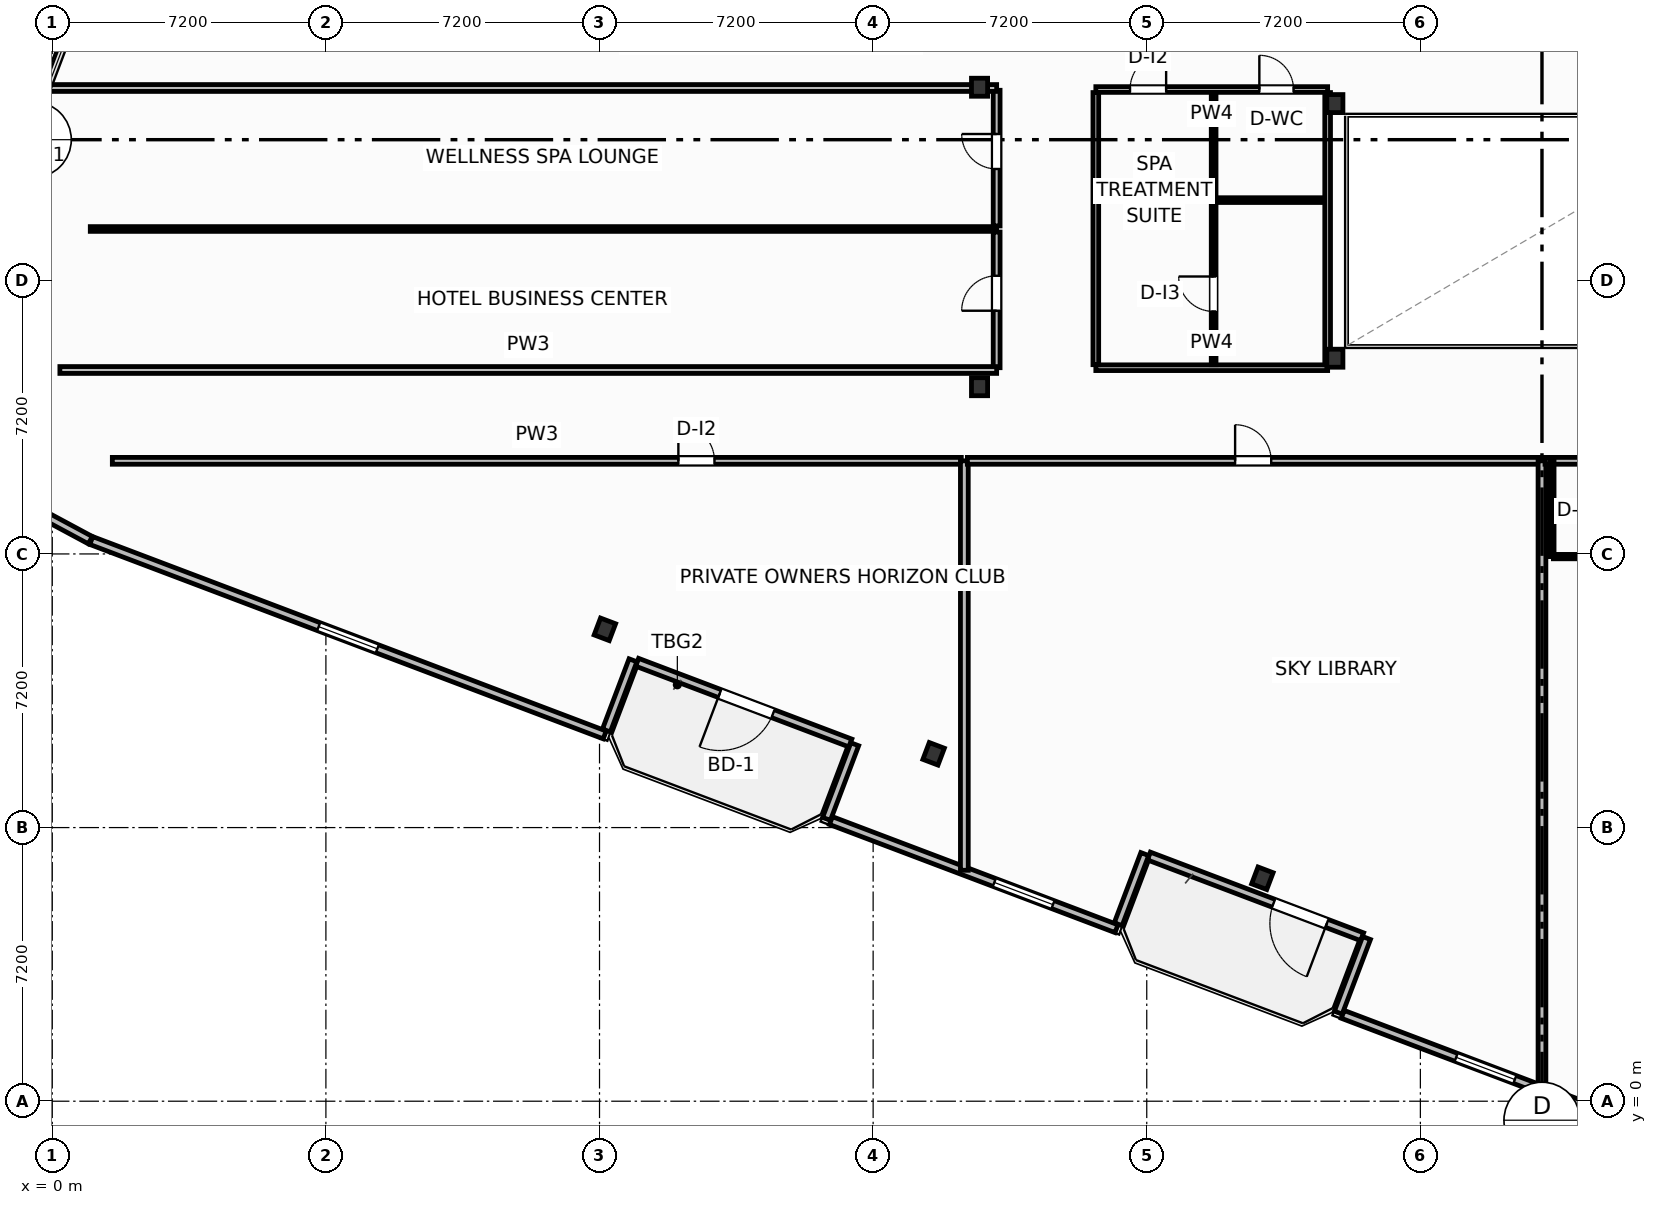
"""IFC4 building model, lengths in metres.
Left out: names, types, materials, properties, quantities, classifications, styles, units other than length and angle.
Written with IfcOpenShell. Run it as: python <this file> out.ifc"""

import sys

from ifc_helpers import new_model, si_unit, direction, frame, frame_2d, origin, origin_2d, place, context, subcontext, project, spatial, rectangle, i_section, extrude, element, fill, save


model = new_model("IFC4")
c1 = context("Model", 3, precision=1e-05, world=origin(), true_north=direction((0.0, 1.0)))
c2 = subcontext(c1, "Body", "Model", "MODEL_VIEW")
j1 = project(units=[si_unit("LENGTHUNIT", "METRE"), si_unit("PLANEANGLEUNIT", "RADIAN")], contexts=[c1])
p1 = place(None, origin())
s1 = spatial("IfcSite", under=j1, at=p1, CompositionType="ELEMENT")
p2 = place(p1, origin())
s2 = spatial("IfcBuilding", under=s1, at=p2, CompositionType="ELEMENT")
p3 = place(p2, frame((0.0, 0.0, 102.1)))
s3 = spatial("IfcBuildingStorey", under=s2, at=p3, CompositionType="ELEMENT", Elevation=102.1)
for number, where, z_axis, x_axis in (
    (1, (33.75, 19.55, 0.0), (0.0, 0.0, 1.0), (1.0, 0.0, 0.0)),
    (2, (33.75, 26.25, 0.0), (0.0, 0.0, 1.0), (1.0, 0.0, 0.0)),
    (3, (24.4, 18.8, 0.0), (0.0, 0.0, 1.0), (1.0, 0.0, 0.0)),
    (4, (24.4, 26.68, 0.0), (0.0, 0.0, 1.0), (1.0, 0.0, 0.0)),
    (5, (14.541, 12.416, 0.0), (0.0, 0.0, 1.0), (0.935, -0.354, 0.0)),
    (6, (23.192, 9.141, 0.0), (0.0, 0.0, 1.0), (0.935, -0.354, 0.0)),
    (7, (31.843, 5.866, 0.0), (0.0, 0.0, 1.0), (0.935, -0.354, 0.0)),
):
    element("IfcColumn", number, at=place(p3, frame(where, z_axis=z_axis, x_axis=x_axis)), inside=s3, PredefinedType="COLUMN", context=c2, shape_type="SweptSolid", body=[
        extrude(i_section(OverallWidth=0.424, OverallDepth=0.474, WebThickness=0.048, FlangeThickness=0.077, FilletRadius=0.025, at=origin_2d()), origin(), (0.0, 0.0, 1.0), 3.7),
    ])
p4 = place(p3, frame((21.0, 9.425, 0.0), z_axis=(0.0, 0.0, 1.0), x_axis=(-0.93521416643, 0.354082565101, 0.0)))
e8 = element("IfcWall", 8, at=p4, inside=s3, PredefinedType="SOLIDWALL", context=c2, shape_type="SweptSolid", body=[
    extrude(rectangle(XDim=6.0, YDim=0.22, at=frame_2d((3.0, 0.0))), origin(), (0.0, 0.0, 1.0), 2.73),
])
p5 = place(p4, frame((2.176, 0.0, 0.0)))
e9 = element("IfcOpeningElement", 9, at=p5, cuts=e8, PredefinedType="OPENING", context=c2, shape_type="SweptSolid", body=[
    extrude(rectangle(XDim=1.5, YDim=2.25, at=frame_2d((0.75, 1.125))), frame((0.0, 0.12, 0.0), z_axis=(0.0, -1.0, 0.0), x_axis=(1.0, 0.0, 0.0)), (0.0, 0.0, 1.0), 0.24),
])
p6 = place(p3, frame((34.468, 4.327, 0.0), z_axis=(0.0, 0.0, 1.0), x_axis=(-0.9352192676, 0.354069091436, 0.0)))
e10 = element("IfcWall", 10, at=p6, inside=s3, PredefinedType="SOLIDWALL", context=c2, shape_type="SweptSolid", body=[
    extrude(rectangle(XDim=6.0, YDim=0.22, at=frame_2d((3.0, 0.0))), origin(), (0.0, 0.0, 1.0), 2.73),
])
p7 = place(p6, frame((0.992, 0.0, 0.0)))
e11 = element("IfcOpeningElement", 11, at=p7, cuts=e10, PredefinedType="OPENING", context=c2, shape_type="SweptSolid", body=[
    extrude(rectangle(XDim=1.5, YDim=2.25, at=frame_2d((0.75, 1.125))), frame((0.0, 0.12, 0.0), z_axis=(0.0, -1.0, 0.0), x_axis=(1.0, 0.0, 0.0)), (0.0, 0.0, 1.0), 0.24),
])
p8 = place(p3, frame((-0.197, 15.406, 0.0), z_axis=(0.0, 0.0, 1.0), x_axis=(0.881023507585, -0.47307248819, 0.0)))
e12 = element("IfcWall", 12, at=p8, inside=s3, PredefinedType="SOLIDWALL", context=c2, shape_type="SweptSolid", body=[
    extrude(rectangle(XDim=1.361, YDim=0.22, at=frame_2d((0.68, 0.0))), origin(), (0.0, 0.0, 1.0), 2.73),
])
p9 = place(p3, frame((1.026, 14.753, 0.0), z_axis=(0.0, 0.0, 1.0), x_axis=(0.935222448475, -0.354060689526, 0.0)))
e13 = element("IfcWall", 13, at=p9, inside=s3, PredefinedType="SOLIDWALL", context=c2, shape_type="SweptSolid", body=[
    extrude(rectangle(XDim=14.447, YDim=0.22, at=frame_2d((7.224, 0.0))), origin(), (0.0, 0.0, 1.0), 2.73),
])
p10 = place(p9, frame((6.399, 0.0, 0.8)))
e14 = element("IfcOpeningElement", 14, at=p10, cuts=e13, PredefinedType="OPENING", context=c2, shape_type="SweptSolid", body=[
    extrude(rectangle(XDim=1.65, YDim=1.65, at=frame_2d((0.825, 0.825))), frame((0.0, 0.12, 0.0), z_axis=(0.0, -1.0, 0.0), x_axis=(1.0, 0.0, 0.0)), (0.0, 0.0, 1.0), 0.24),
])
p11 = place(p3, frame((14.581, 9.755, 0.0), z_axis=(0.0, 0.0, 1.0), x_axis=(0.354061611705, 0.935222099352, 0.0)))
e15 = element("IfcWall", 15, at=p11, inside=s3, PredefinedType="SOLIDWALL", context=c2, shape_type="SweptSolid", body=[
    extrude(rectangle(XDim=1.975, YDim=0.22, at=frame_2d((0.987, 0.0))), origin(), (0.0, 0.0, 1.0), 2.73),
])
p12 = place(p3, frame((21.116, 9.392, 0.0), z_axis=(0.0, 0.0, 1.0), x_axis=(-0.353988291547, -0.935249854022, 0.0)))
e16 = element("IfcWall", 16, at=p12, inside=s3, PredefinedType="SOLIDWALL", context=c2, shape_type="SweptSolid", body=[
    extrude(rectangle(XDim=2.1, YDim=0.22, at=frame_2d((1.05, 0.0))), origin(), (0.0, 0.0, 1.0), 2.73),
])
p13 = place(p3, frame((20.49, 7.384, 0.0), z_axis=(0.0, 0.0, 1.0), x_axis=(0.935230796934, -0.354038636968, 0.0)))
e17 = element("IfcWall", 17, at=p13, inside=s3, PredefinedType="SOLIDWALL", context=c2, shape_type="SweptSolid", body=[
    extrude(rectangle(XDim=8.035, YDim=0.22, at=frame_2d((4.018, 0.0))), origin(), (0.0, 0.0, 1.0), 2.73),
])
p14 = place(p13, frame((4.597, 0.0, 0.8)))
e18 = element("IfcOpeningElement", 18, at=p14, cuts=e17, PredefinedType="OPENING", context=c2, shape_type="SweptSolid", body=[
    extrude(rectangle(XDim=1.65, YDim=1.65, at=frame_2d((0.825, 0.825))), frame((0.0, 0.12, 0.0), z_axis=(0.0, -1.0, 0.0), x_axis=(1.0, 0.0, 0.0)), (0.0, 0.0, 1.0), 0.24),
])
p15 = place(p3, frame((28.048, 4.656, 0.0), z_axis=(0.0, 0.0, 1.0), x_axis=(0.354128791944, 0.935196663123, 0.0)))
e19 = element("IfcWall", 19, at=p15, inside=s3, PredefinedType="SOLIDWALL", context=c2, shape_type="SweptSolid", body=[
    extrude(rectangle(XDim=1.975, YDim=0.22, at=frame_2d((0.988, 0.0))), origin(), (0.0, 0.0, 1.0), 2.73),
])
p16 = place(p3, frame((34.583, 4.294, 0.0), z_axis=(0.0, 0.0, 1.0), x_axis=(-0.354128469405, -0.935196785258, 0.0)))
e20 = element("IfcWall", 20, at=p16, inside=s3, PredefinedType="SOLIDWALL", context=c2, shape_type="SweptSolid", body=[
    extrude(rectangle(XDim=2.1, YDim=0.22, at=frame_2d((1.05, 0.0))), origin(), (0.0, 0.0, 1.0), 2.73),
])
p17 = place(p3, frame((33.957, 2.286, 0.0), z_axis=(0.0, 0.0, 1.0), x_axis=(0.935220736163, -0.354065212427, 0.0)))
e21 = element("IfcWall", 21, at=p17, inside=s3, PredefinedType="SOLIDWALL", context=c2, shape_type="SweptSolid", body=[
    extrude(rectangle(XDim=8.035, YDim=0.22, at=frame_2d((4.018, 0.0))), origin(), (0.0, 0.0, 1.0), 2.73),
])
p18 = place(p17, frame((3.192, 0.0, 0.8)))
e22 = element("IfcOpeningElement", 22, at=p18, cuts=e21, PredefinedType="OPENING", context=c2, shape_type="SweptSolid", body=[
    extrude(rectangle(XDim=1.65, YDim=1.65, at=frame_2d((0.825, 0.825))), frame((0.0, 0.12, 0.0), z_axis=(0.0, -1.0, 0.0), x_axis=(1.0, 0.0, 0.0)), (0.0, 0.0, 1.0), 0.24),
])
p19 = place(p3, frame((1.58, 16.85, 0.0), z_axis=(0.0, 0.0, 1.0), x_axis=(1.0, 0.0, 0.0)))
e23 = element("IfcWall", 23, at=p19, inside=s3, PredefinedType="PARTITIONING", context=c2, shape_type="SweptSolid", body=[
    extrude(rectangle(XDim=22.34, YDim=0.18, at=frame_2d((11.17, 0.0))), origin(), (0.0, 0.0, 1.0), 3.45),
])
p20 = place(p19, frame((14.895, 0.0, 0.0)))
e24 = element("IfcOpeningElement", 24, at=p20, cuts=e23, PredefinedType="OPENING", context=c2, shape_type="SweptSolid", body=[
    extrude(rectangle(XDim=0.95, YDim=2.05, at=frame_2d((0.475, 1.025))), frame((0.0, 0.1, 0.0), z_axis=(0.0, -1.0, 0.0), x_axis=(1.0, 0.0, 0.0)), (0.0, 0.0, 1.0), 0.2),
])
p21 = place(p3, frame((24.0, 6.076, 0.0), z_axis=(0.0, 0.0, 1.0), x_axis=(0.0, 1.0, 0.0)))
e25 = element("IfcWall", 25, at=p21, inside=s3, PredefinedType="PARTITIONING", context=c2, shape_type="SweptSolid", body=[
    extrude(rectangle(XDim=10.774, YDim=0.205, at=frame_2d((5.387, 0.0))), origin(), (0.0, 0.0, 1.0), 2.58),
])
p22 = place(p3, frame((24.08, 16.85, 0.0), z_axis=(0.0, 0.0, 1.0), x_axis=(1.0, 0.0, 0.0)))
e26 = element("IfcWall", 26, at=p22, inside=s3, PredefinedType="PARTITIONING", context=c2, shape_type="SweptSolid", body=[
    extrude(rectangle(XDim=15.04, YDim=0.18, at=frame_2d((7.52, 0.0))), origin(), (0.0, 0.0, 1.0), 3.45),
])
p23 = place(p22, frame((7.045, 0.0, 0.0)))
e27 = element("IfcOpeningElement", 27, at=p23, cuts=e26, PredefinedType="OPENING", context=c2, shape_type="SweptSolid", body=[
    extrude(rectangle(XDim=0.95, YDim=2.05, at=frame_2d((0.475, 1.025))), frame((0.0, 0.1, 0.0), z_axis=(0.0, -1.0, 0.0), x_axis=(1.0, 0.0, 0.0)), (0.0, 0.0, 1.0), 0.2),
])
p24 = place(p3, frame((39.2, 0.322, 0.0), z_axis=(0.0, 0.0, 1.0), x_axis=(0.0, 1.0, 0.0)))
e28 = element("IfcWall", 28, at=p24, inside=s3, PredefinedType="PARTITIONING", context=c2, shape_type="SweptSolid", body=[
    extrude(rectangle(XDim=16.528, YDim=0.205, at=frame_2d((8.264, 0.0))), origin(), (0.0, 0.0, 1.0), 3.45),
])
p25 = place(p3, frame((39.28, 16.85, 0.0), z_axis=(0.0, 0.0, 1.0), x_axis=(1.0, 0.0, 0.0)))
e29 = element("IfcWall", 29, at=p25, inside=s3, PredefinedType="PARTITIONING", context=c2, shape_type="SweptSolid", body=[
    extrude(rectangle(XDim=14.64, YDim=0.18, at=frame_2d((7.32, 0.0))), origin(), (0.0, 0.0, 1.0), 3.45),
])
p26 = place(p25, frame((3.322, 0.0, 0.0)))
e30 = element("IfcOpeningElement", 30, at=p26, cuts=e29, PredefinedType="OPENING", context=c2, shape_type="SweptSolid", body=[
    extrude(rectangle(XDim=0.95, YDim=2.15, at=frame_2d((0.475, 1.075))), frame((0.0, 0.1, 0.0), z_axis=(0.0, -1.0, 0.0), x_axis=(1.0, 0.0, 0.0)), (0.0, 0.0, 1.0), 0.2),
])
p27 = place(p3, frame((39.5, 14.33, 0.0), z_axis=(0.0, 0.0, 1.0), x_axis=(1.0, 0.0, 0.0)))
e31 = element("IfcWall", 31, at=p27, inside=s3, PredefinedType="PARTITIONING", context=c2, shape_type="SweptSolid", body=[
    extrude(rectangle(XDim=2.15, YDim=0.115, at=frame_2d((1.075, 0.0))), origin(), (0.0, 0.0, 1.0), 3.45),
])
p28 = place(p3, frame((39.46, 14.33, 0.0), z_axis=(0.0, 0.0, 1.0), x_axis=(0.0, 1.0, 0.0)))
e32 = element("IfcWall", 32, at=p28, inside=s3, PredefinedType="PARTITIONING", context=c2, shape_type="SweptSolid", body=[
    extrude(rectangle(XDim=2.52, YDim=0.115, at=frame_2d((1.26, 0.0))), origin(), (0.0, 0.0, 1.0), 3.45),
])
p29 = place(p3, frame((24.85, 19.3, 0.0), z_axis=(0.0, 0.0, 1.0), x_axis=(0.0, 1.0, 0.0)))
e33 = element("IfcWall", 33, at=p29, inside=s3, PredefinedType="PARTITIONING", context=c2, shape_type="SweptSolid", body=[
    extrude(rectangle(XDim=3.57, YDim=0.18, at=frame_2d((1.785, 0.0))), origin(), (0.0, 0.0, 1.0), 3.45),
])
p30 = place(p29, frame((1.5, 0.0, 0.0)))
e34 = element("IfcOpeningElement", 34, at=p30, cuts=e33, PredefinedType="OPENING", context=c2, shape_type="SweptSolid", body=[
    extrude(rectangle(XDim=0.92, YDim=2.05, at=frame_2d((0.46, 1.025))), frame((0.0, 0.1, 0.0), z_axis=(0.0, -1.0, 0.0), x_axis=(1.0, 0.0, 0.0)), (0.0, 0.0, 1.0), 0.2),
])
p31 = place(p3, frame((24.85, 23.03, 0.0), z_axis=(0.0, 0.0, 1.0), x_axis=(0.0, 1.0, 0.0)))
e35 = element("IfcWall", 35, at=p31, inside=s3, PredefinedType="PARTITIONING", context=c2, shape_type="SweptSolid", body=[
    extrude(rectangle(XDim=3.57, YDim=0.18, at=frame_2d((1.785, 0.0))), origin(), (0.0, 0.0, 1.0), 3.45),
])
p32 = place(p31, frame((1.5, 0.0, 0.0)))
e36 = element("IfcOpeningElement", 36, at=p32, cuts=e35, PredefinedType="OPENING", context=c2, shape_type="SweptSolid", body=[
    extrude(rectangle(XDim=0.92, YDim=2.05, at=frame_2d((0.46, 1.025))), frame((0.0, 0.1, 0.0), z_axis=(0.0, -1.0, 0.0), x_axis=(1.0, 0.0, 0.0)), (0.0, 0.0, 1.0), 0.2),
])
p33 = place(p3, frame((1.0, 22.95, 0.0), z_axis=(0.0, 0.0, 1.0), x_axis=(1.0, 0.0, 0.0)))
e37 = element("IfcWall", 37, at=p33, inside=s3, PredefinedType="PARTITIONING", context=c2, shape_type="SweptSolid", body=[
    extrude(rectangle(XDim=23.85, YDim=0.125, at=frame_2d((11.925, 0.0))), origin(), (0.0, 0.0, 1.0), 3.45),
])
p34 = place(p3, frame((0.2, 19.24, 0.0), z_axis=(0.0, 0.0, 1.0), x_axis=(1.0, 0.0, 0.0)))
e38 = element("IfcWall", 38, at=p34, inside=s3, PredefinedType="PARTITIONING", context=c2, shape_type="SweptSolid", body=[
    extrude(rectangle(XDim=24.65, YDim=0.18, at=frame_2d((12.325, 0.0))), origin(), (0.0, 0.0, 1.0), 3.45),
])
p35 = place(p3, frame((-0.086, 26.66, 0.0), z_axis=(0.0, 0.0, 1.0), x_axis=(1.0, 0.0, 0.0)))
e39 = element("IfcWall", 39, at=p35, inside=s3, PredefinedType="PARTITIONING", context=c2, shape_type="SweptSolid", body=[
    extrude(rectangle(XDim=24.936, YDim=0.18, at=frame_2d((12.468, 0.0))), origin(), (0.0, 0.0, 1.0), 2.662),
])
p36 = place(p3, frame((27.46, 26.62, 0.0), z_axis=(0.0, 0.0, 1.0), x_axis=(1.0, 0.0, 0.0)))
e40 = element("IfcWall", 40, at=p36, inside=s3, PredefinedType="PARTITIONING", context=c2, shape_type="SweptSolid", body=[
    extrude(rectangle(XDim=6.1, YDim=0.15, at=frame_2d((3.05, 0.0))), origin(), (0.0, 0.0, 1.0), 2.662),
])
p37 = place(p36, frame((0.9, 0.0, 0.0)))
e41 = element("IfcOpeningElement", 41, at=p37, cuts=e40, PredefinedType="OPENING", context=c2, shape_type="SweptSolid", body=[
    extrude(rectangle(XDim=0.95, YDim=2.05, at=frame_2d((0.475, 1.025))), frame((0.0, 0.085, 0.0), z_axis=(0.0, -1.0, 0.0), x_axis=(1.0, 0.0, 0.0)), (0.0, 0.0, 1.0), 0.17),
])
p38 = place(p36, frame((4.303, 0.0, 0.0)))
e42 = element("IfcOpeningElement", 42, at=p38, cuts=e40, PredefinedType="OPENING", context=c2, shape_type="SweptSolid", body=[
    extrude(rectangle(XDim=0.9, YDim=2.05, at=frame_2d((0.45, 1.025))), frame((0.0, 0.085, 0.0), z_axis=(0.0, -1.0, 0.0), x_axis=(1.0, 0.0, 0.0)), (0.0, 0.0, 1.0), 0.17),
])
p39 = place(p3, frame((27.46, 19.3, 0.0), z_axis=(0.0, 0.0, 1.0), x_axis=(1.0, 0.0, 0.0)))
e43 = element("IfcWall", 43, at=p39, inside=s3, PredefinedType="PARTITIONING", context=c2, shape_type="SweptSolid", body=[
    extrude(rectangle(XDim=6.1, YDim=0.15, at=frame_2d((3.05, 0.0))), origin(), (0.0, 0.0, 1.0), 2.662),
])
p40 = place(p3, frame((30.56, 19.38, 0.0), z_axis=(0.0, 0.0, 1.0), x_axis=(0.0, 1.0, 0.0)))
e44 = element("IfcWall", 44, at=p40, inside=s3, PredefinedType="PARTITIONING", context=c2, shape_type="SweptSolid", body=[
    extrude(rectangle(XDim=7.16, YDim=0.125, at=frame_2d((3.58, 0.0))), origin(), (0.0, 0.0, 1.0), 3.45),
])
p41 = place(p40, frame((1.4, 0.0, 0.0)))
e45 = element("IfcOpeningElement", 45, at=p41, cuts=e44, PredefinedType="OPENING", context=c2, shape_type="SweptSolid", body=[
    extrude(rectangle(XDim=0.92, YDim=2.05, at=frame_2d((0.46, 1.025))), frame((0.0, 0.073, 0.0), z_axis=(0.0, -1.0, 0.0), x_axis=(1.0, 0.0, 0.0)), (0.0, 0.0, 1.0), 0.145),
])
p42 = place(p3, frame((30.64, 23.71, 0.0), z_axis=(0.0, 0.0, 1.0), x_axis=(1.0, 0.0, 0.0)))
e46 = element("IfcWall", 46, at=p42, inside=s3, PredefinedType="PARTITIONING", context=c2, shape_type="SweptSolid", body=[
    extrude(rectangle(XDim=2.88, YDim=0.125, at=frame_2d((1.44, 0.0))), origin(), (0.0, 0.0, 1.0), 3.45),
])
p43 = place(p3, frame((27.46, 19.38, 0.0), z_axis=(0.0, 0.0, 1.0), x_axis=(0.0, 1.0, 0.0)))
e47 = element("IfcWall", 47, at=p43, inside=s3, PredefinedType="PARTITIONING", context=c2, shape_type="SweptSolid", body=[
    extrude(rectangle(XDim=7.16, YDim=0.15, at=frame_2d((3.58, 0.0))), origin(), (0.0, 0.0, 1.0), 3.45),
])
p44 = place(p3, frame((33.56, 19.38, 0.0), z_axis=(0.0, 0.0, 1.0), x_axis=(0.0, 1.0, 0.0)))
e48 = element("IfcWall", 48, at=p44, inside=s3, PredefinedType="PARTITIONING", context=c2, shape_type="SweptSolid", body=[
    extrude(rectangle(XDim=7.16, YDim=0.15, at=frame_2d((3.58, 0.0))), origin(), (0.0, 0.0, 1.0), 2.824),
])
p45 = place(p5, origin())
e49 = element("IfcDoor", 49, at=p45, inside=s3, OperationType="SINGLE_SWING_RIGHT", PredefinedType="DOOR", context=c2, shape_type="SweptSolid", body=[
    extrude(rectangle(XDim=1.5, YDim=2.25, at=frame_2d((0.75, 1.125))), frame((0.0, 0.025, 0.0), z_axis=(0.0, -1.0, 0.0), x_axis=(1.0, 0.0, 0.0)), (0.0, 0.0, 1.0), 0.05),
])
fill(e9, e49)
p46 = place(p7, origin())
e50 = element("IfcDoor", 50, at=p46, inside=s3, OperationType="SINGLE_SWING_LEFT", PredefinedType="DOOR", context=c2, shape_type="SweptSolid", body=[
    extrude(rectangle(XDim=1.5, YDim=2.25, at=frame_2d((0.75, 1.125))), frame((0.0, 0.025, 0.0), z_axis=(0.0, -1.0, 0.0), x_axis=(1.0, 0.0, 0.0)), (0.0, 0.0, 1.0), 0.05),
])
fill(e11, e50)
p47 = place(p10, origin())
e51 = element("IfcWindow", 51, at=p47, inside=s3, PartitioningType="SINGLE_PANEL", PredefinedType="WINDOW", context=c2, shape_type="SweptSolid", body=[
    extrude(rectangle(XDim=1.65, YDim=1.65, at=frame_2d((0.825, 0.825))), frame((0.0, 0.03, 0.0), z_axis=(0.0, -1.0, 0.0), x_axis=(1.0, 0.0, 0.0)), (0.0, 0.0, 1.0), 0.06),
])
fill(e14, e51)
p48 = place(p14, origin())
e52 = element("IfcWindow", 52, at=p48, inside=s3, PartitioningType="SINGLE_PANEL", PredefinedType="WINDOW", context=c2, shape_type="SweptSolid", body=[
    extrude(rectangle(XDim=1.65, YDim=1.65, at=frame_2d((0.825, 0.825))), frame((0.0, 0.03, 0.0), z_axis=(0.0, -1.0, 0.0), x_axis=(1.0, 0.0, 0.0)), (0.0, 0.0, 1.0), 0.06),
])
fill(e18, e52)
p49 = place(p18, origin())
e53 = element("IfcWindow", 53, at=p49, inside=s3, PartitioningType="SINGLE_PANEL", PredefinedType="WINDOW", context=c2, shape_type="SweptSolid", body=[
    extrude(rectangle(XDim=1.65, YDim=1.65, at=frame_2d((0.825, 0.825))), frame((0.0, 0.03, 0.0), z_axis=(0.0, -1.0, 0.0), x_axis=(1.0, 0.0, 0.0)), (0.0, 0.0, 1.0), 0.06),
])
fill(e22, e53)
p50 = place(p20, origin())
e54 = element("IfcDoor", 54, at=p50, inside=s3, OperationType="SINGLE_SWING_LEFT", PredefinedType="DOOR", context=c2, shape_type="SweptSolid", body=[
    extrude(rectangle(XDim=0.95, YDim=2.05, at=frame_2d((0.475, 1.025))), frame((0.0, 0.025, 0.0), z_axis=(0.0, -1.0, 0.0), x_axis=(1.0, 0.0, 0.0)), (0.0, 0.0, 1.0), 0.05),
])
fill(e24, e54)
p51 = place(p23, origin())
e55 = element("IfcDoor", 55, at=p51, inside=s3, OperationType="SINGLE_SWING_LEFT", PredefinedType="DOOR", context=c2, shape_type="SweptSolid", body=[
    extrude(rectangle(XDim=0.95, YDim=2.05, at=frame_2d((0.475, 1.025))), frame((0.0, 0.025, 0.0), z_axis=(0.0, -1.0, 0.0), x_axis=(1.0, 0.0, 0.0)), (0.0, 0.0, 1.0), 0.05),
])
fill(e27, e55)
p52 = place(p30, origin())
e56 = element("IfcDoor", 56, at=p52, inside=s3, OperationType="SINGLE_SWING_LEFT", PredefinedType="DOOR", context=c2, shape_type="SweptSolid", body=[
    extrude(rectangle(XDim=0.92, YDim=2.05, at=frame_2d((0.46, 1.025))), frame((0.0, 0.025, 0.0), z_axis=(0.0, -1.0, 0.0), x_axis=(1.0, 0.0, 0.0)), (0.0, 0.0, 1.0), 0.05),
])
fill(e34, e56)
p53 = place(p32, origin())
e57 = element("IfcDoor", 57, at=p53, inside=s3, OperationType="SINGLE_SWING_RIGHT", PredefinedType="DOOR", context=c2, shape_type="SweptSolid", body=[
    extrude(rectangle(XDim=0.92, YDim=2.05, at=frame_2d((0.46, 1.025))), frame((0.0, 0.025, 0.0), z_axis=(0.0, -1.0, 0.0), x_axis=(1.0, 0.0, 0.0)), (0.0, 0.0, 1.0), 0.05),
])
fill(e36, e57)
p54 = place(p37, origin())
e58 = element("IfcDoor", 58, at=p54, inside=s3, OperationType="SINGLE_SWING_RIGHT", PredefinedType="DOOR", context=c2, shape_type="SweptSolid", body=[
    extrude(rectangle(XDim=0.95, YDim=2.05, at=frame_2d((0.475, 1.025))), frame((0.0, 0.025, 0.0), z_axis=(0.0, -1.0, 0.0), x_axis=(1.0, 0.0, 0.0)), (0.0, 0.0, 1.0), 0.05),
])
fill(e41, e58)
p55 = place(p38, origin())
e59 = element("IfcDoor", 59, at=p55, inside=s3, OperationType="SINGLE_SWING_LEFT", PredefinedType="DOOR", context=c2, shape_type="SweptSolid", body=[
    extrude(rectangle(XDim=0.9, YDim=2.05, at=frame_2d((0.45, 1.025))), frame((0.0, 0.025, 0.0), z_axis=(0.0, -1.0, 0.0), x_axis=(1.0, 0.0, 0.0)), (0.0, 0.0, 1.0), 0.05),
])
fill(e42, e59)
p56 = place(p41, origin())
e60 = element("IfcDoor", 60, at=p56, inside=s3, OperationType="SINGLE_SWING_RIGHT", PredefinedType="DOOR", context=c2, shape_type="SweptSolid", body=[
    extrude(rectangle(XDim=0.92, YDim=2.05, at=frame_2d((0.46, 1.025))), frame((0.0, 0.025, 0.0), z_axis=(0.0, -1.0, 0.0), x_axis=(1.0, 0.0, 0.0)), (0.0, 0.0, 1.0), 0.05),
])
fill(e45, e60)
save(model, sys.argv[1])
